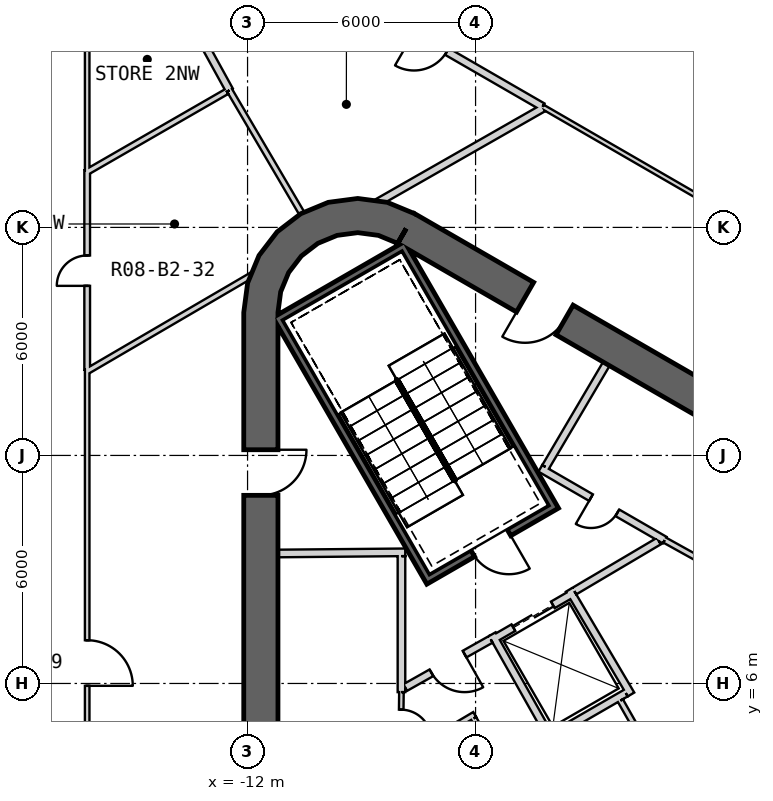
"""IFC4 building model, lengths in metres.
Left out: names, types, materials, properties, quantities, classifications, styles, units other than length and angle.
Written with IfcOpenShell. Run it as: python <this file> out.ifc"""

import sys

from ifc_helpers import new_model, si_unit, direction, frame, frame_2d, origin, place, context, subcontext, project, spatial, polyline, rectangle, outline, extrude, element, fill, save


model = new_model("IFC4")
c1 = context("Model", 3, precision=1e-05, world=origin(), true_north=direction((0.0, 1.0)))
c2 = subcontext(c1, "Body", "Model", "MODEL_VIEW")
j1 = project(units=[si_unit("LENGTHUNIT", "METRE"), si_unit("PLANEANGLEUNIT", "RADIAN")], contexts=[c1])
p1 = place(None, origin())
s1 = spatial("IfcSite", under=j1, at=p1, CompositionType="ELEMENT")
p2 = place(p1, origin())
s2 = spatial("IfcBuilding", under=s1, at=p2, CompositionType="ELEMENT")
p3 = place(p2, frame((0.0, 0.0, -11.0)))
s3 = spatial("IfcBuildingStorey", under=s2, at=p3, CompositionType="ELEMENT", Elevation=-11.0)
p4 = place(p3, frame((-2.593, 37.429, -0.4), z_axis=(0.0, 0.0, 1.0), x_axis=(0.866166543136, -0.499755459752, 0.0)))
e1 = element("IfcWall", 1, at=p4, inside=s3, PredefinedType="SHEAR", context=c2, shape_type="SweptSolid", body=[
    extrude(rectangle(XDim=41.622, YDim=1.2, at=frame_2d((20.811, 0.0))), origin(), (0.0, 0.0, 1.0), 5.9),
])
p5 = place(p3, frame((19.475, 2.208, -0.4), z_axis=(0.0, 0.0, 1.0), x_axis=(-0.866028369851, 0.499994862586, 0.0)))
e2 = element("IfcWall", 2, at=p5, inside=s3, PredefinedType="SHEAR", context=c2, shape_type="SweptSolid", body=[
    extrude(rectangle(XDim=31.523, YDim=0.9, at=frame_2d((15.762, 0.0))), origin(), (0.0, 0.0, 1.0), 5.9),
])
p6 = place(p5, frame((3.612, 0.0, 0.4)))
e3 = element("IfcOpeningElement", 3, at=p6, cuts=e2, PredefinedType="OPENING", context=c2, shape_type="SweptSolid", body=[
    extrude(rectangle(XDim=1.2, YDim=2.4, at=frame_2d((0.6, 1.2))), frame((0.0, 0.46, 0.0), z_axis=(0.0, -1.0, 0.0), x_axis=(1.0, 0.0, 0.0)), (0.0, 0.0, 1.0), 0.92),
])
p7 = place(p5, frame((26.712, 0.0, 0.4)))
e4 = element("IfcOpeningElement", 4, at=p7, cuts=e2, PredefinedType="OPENING", context=c2, shape_type="SweptSolid", body=[
    extrude(rectangle(XDim=1.2, YDim=2.4, at=frame_2d((0.6, 1.2))), frame((0.0, 0.46, 0.0), z_axis=(0.0, -1.0, 0.0), x_axis=(1.0, 0.0, 0.0)), (0.0, 0.0, 1.0), 0.92),
])
p8 = place(p3, frame((-11.65, 15.762, -0.4), z_axis=(0.0, 0.0, 1.0), x_axis=(0.0, -1.0, 0.0)))
e5 = element("IfcWall", 5, at=p8, inside=s3, PredefinedType="SHEAR", context=c2, shape_type="SweptSolid", body=[
    extrude(rectangle(XDim=31.523, YDim=0.9, at=frame_2d((15.762, 0.0))), origin(), (0.0, 0.0, 1.0), 5.9),
])
p9 = place(p8, frame((3.612, 0.0, 0.4)))
e6 = element("IfcOpeningElement", 6, at=p9, cuts=e5, PredefinedType="OPENING", context=c2, shape_type="SweptSolid", body=[
    extrude(rectangle(XDim=1.2, YDim=2.4, at=frame_2d((0.6, 1.2))), frame((0.0, 0.46, 0.0), z_axis=(0.0, -1.0, 0.0), x_axis=(1.0, 0.0, 0.0)), (0.0, 0.0, 1.0), 0.92),
])
p10 = place(p8, frame((26.712, 0.0, 0.4)))
e7 = element("IfcOpeningElement", 7, at=p10, cuts=e5, PredefinedType="OPENING", context=c2, shape_type="SweptSolid", body=[
    extrude(rectangle(XDim=1.2, YDim=2.4, at=frame_2d((0.6, 1.2))), frame((0.0, 0.46, 0.0), z_axis=(0.0, -1.0, 0.0), x_axis=(1.0, 0.0, 0.0)), (0.0, 0.0, 1.0), 0.92),
])
p11 = place(p3, frame((0.0, 0.0, -0.4)))
e8 = element("IfcWall", 8, at=p11, inside=s3, PredefinedType="SHEAR", context=c2, shape_type="SweptSolid", body=[
    extrude(outline(polyline([(-7.6, 18.36), (-8.323, 18.659), (-9.1, 18.762), (-9.876, 18.659), (-10.6, 18.36), (-11.221, 17.883), (-11.698, 17.262), (-11.998, 16.538), (-12.1, 15.762), (-11.2, 15.762), (-11.128, 16.305), (-10.919, 16.812), (-10.585, 17.247), (-10.15, 17.58), (-9.644, 17.79), (-9.1, 17.862), (-8.556, 17.79), (-8.05, 17.58), (-7.6, 18.36)])), origin(), (0.0, 0.0, 1.0), 5.9),
])
p12 = place(p3, frame((-11.245, 15.678, -0.4), z_axis=(0.0, 0.0, 1.0), x_axis=(0.499977274689, -0.866038523851, 0.0)))
e9 = element("IfcWall", 9, at=p12, inside=s3, PredefinedType="SHEAR", context=c2, shape_type="SweptSolid", body=[
    extrude(rectangle(XDim=8.1, YDim=0.2, at=frame_2d((4.05, 0.0))), origin(), (0.0, 0.0, 1.0), 5.5),
])
p13 = place(p3, frame((-7.818, 17.541, -0.4), z_axis=(0.0, 0.0, 1.0), x_axis=(-0.866044365799, -0.499967155389, 0.0)))
e10 = element("IfcWall", 10, at=p13, inside=s3, PredefinedType="SHEAR", context=c2, shape_type="SweptSolid", body=[
    extrude(rectangle(XDim=3.8, YDim=0.2, at=frame_2d((1.9, 0.0))), origin(), (0.0, 0.0, 1.0), 5.5),
])
p14 = place(p3, frame((-7.854, 17.405, -0.4), z_axis=(0.0, 0.0, 1.0), x_axis=(0.499997992926, -0.866026562566, 0.0)))
e11 = element("IfcWall", 11, at=p14, inside=s3, PredefinedType="SHEAR", context=c2, shape_type="SweptSolid", body=[
    extrude(rectangle(XDim=7.9, YDim=0.2, at=frame_2d((3.95, 0.0))), origin(), (0.0, 0.0, 1.0), 5.5),
])
p15 = place(p3, frame((-7.159, 8.8, -0.4), z_axis=(0.0, 0.0, 1.0), x_axis=(0.866047807691, 0.499961193289, 0.0)))
e12 = element("IfcWall", 12, at=p15, inside=s3, PredefinedType="SHEAR", context=c2, shape_type="SweptSolid", body=[
    extrude(rectangle(XDim=3.6, YDim=0.2, at=frame_2d((1.8, 0.0))), origin(), (0.0, 0.0, 1.0), 5.5),
])
p16 = place(p15, frame((1.25, 0.0, 0.4)))
e13 = element("IfcOpeningElement", 13, at=p16, cuts=e12, PredefinedType="OPENING", context=c2, shape_type="SweptSolid", body=[
    extrude(rectangle(XDim=1.1, YDim=2.1, at=frame_2d((0.55, 1.05))), frame((0.0, 0.11, 0.0), z_axis=(0.0, -1.0, 0.0), x_axis=(1.0, 0.0, 0.0)), (0.0, 0.0, 1.0), 0.22),
])
p17 = place(p3, frame((-5.524, 7.168, 0.0), z_axis=(0.0, 0.0, 1.0), x_axis=(0.866024647952, 0.500001309137, 0.0)))
e14 = element("IfcWall", 14, at=p17, inside=s3, PredefinedType="PLUMBINGWALL", context=c2, shape_type="SweptSolid", body=[
    extrude(rectangle(XDim=2.4, YDim=0.2, at=frame_2d((1.2, 0.0))), origin(), (0.0, 0.0, 1.0), 5.1),
])
p18 = place(p17, frame((0.6, 0.0, 0.0)))
e15 = element("IfcOpeningElement", 15, at=p18, cuts=e14, PredefinedType="OPENING", context=c2, shape_type="SweptSolid", body=[
    extrude(rectangle(XDim=1.2, YDim=2.4, at=frame_2d((0.6, 1.2))), frame((0.0, 0.11, 0.0), z_axis=(0.0, -1.0, 0.0), x_axis=(1.0, 0.0, 0.0)), (0.0, 0.0, 1.0), 0.22),
])
p19 = place(p3, frame((-3.538, 8.465, 0.0), z_axis=(0.0, 0.0, 1.0), x_axis=(0.508616218331, -0.860993346345, 0.0)))
e16 = element("IfcWall", 16, at=p19, inside=s3, PredefinedType="PLUMBINGWALL", context=c2, shape_type="SweptSolid", body=[
    extrude(rectangle(XDim=3.2, YDim=0.2, at=frame_2d((1.6, 0.0))), origin(), (0.0, 0.0, 1.0), 5.1),
])
p20 = place(p3, frame((-2.047, 5.746, 0.0), z_axis=(0.0, 0.0, 1.0), x_axis=(-0.866024647952, -0.500001309137, 0.0)))
e17 = element("IfcWall", 17, at=p20, inside=s3, PredefinedType="PLUMBINGWALL", context=c2, shape_type="SweptSolid", body=[
    extrude(rectangle(XDim=2.4, YDim=0.2, at=frame_2d((1.2, 0.0))), origin(), (0.0, 0.0, 1.0), 5.1),
])
p21 = place(p3, frame((-5.562, 7.296, 0.0), z_axis=(0.0, 0.0, 1.0), x_axis=(0.49134651263, -0.870964180966, 0.0)))
e18 = element("IfcWall", 18, at=p21, inside=s3, PredefinedType="PLUMBINGWALL", context=c2, shape_type="SweptSolid", body=[
    extrude(rectangle(XDim=3.0, YDim=0.2, at=frame_2d((1.5, 0.0))), origin(), (0.0, 0.0, 1.0), 5.1),
])
p22 = place(p3, frame((-7.85, 9.451, 0.0), z_axis=(0.0, 0.0, 1.0), x_axis=(-0.999957167047, -0.009255488683, 0.0)))
e19 = element("IfcWall", 19, at=p22, inside=s3, PredefinedType="PARTITIONING", context=c2, shape_type="SweptSolid", body=[
    extrude(rectangle(XDim=3.35, YDim=0.2, at=frame_2d((1.675, 0.0))), origin(), (0.0, 0.0, 1.0), 5.1),
])
p23 = place(p3, frame((-7.95, 5.772, 0.0), z_axis=(0.0, 0.0, 1.0), x_axis=(0.0, 1.0, 0.0)))
e20 = element("IfcWall", 20, at=p23, inside=s3, PredefinedType="PARTITIONING", context=c2, shape_type="SweptSolid", body=[
    extrude(rectangle(XDim=3.578, YDim=0.2, at=frame_2d((1.789, 0.0))), origin(), (0.0, 0.0, 1.0), 5.1),
])
p24 = place(p3, frame((-7.971, 4.05, 0.0), z_axis=(0.0, 0.0, 1.0), x_axis=(0.012047318415, 0.999927428426, 0.0)))
e21 = element("IfcWall", 21, at=p24, inside=s3, PredefinedType="PARTITIONING", context=c2, shape_type="SweptSolid", body=[
    extrude(rectangle(XDim=1.723, YDim=0.12, at=frame_2d((0.861, 0.0))), origin(), (0.0, 0.0, 1.0), 5.1),
])
p25 = place(p24, frame((0.461, 0.0, 0.0)))
e22 = element("IfcOpeningElement", 22, at=p25, cuts=e21, PredefinedType="OPENING", context=c2, shape_type="SweptSolid", body=[
    extrude(rectangle(XDim=0.8, YDim=2.1, at=frame_2d((0.4, 1.05))), frame((0.0, 0.07, 0.0), z_axis=(0.0, -1.0, 0.0), x_axis=(1.0, 0.0, 0.0)), (0.0, 0.0, 1.0), 0.14),
])
p26 = place(p3, frame((-4.296, 11.66, 0.0), z_axis=(0.0, 0.0, 1.0), x_axis=(0.866027389382, -0.499996560828, 0.0)))
e23 = element("IfcWall", 23, at=p26, inside=s3, PredefinedType="PARTITIONING", context=c2, shape_type="SweptSolid", body=[
    extrude(rectangle(XDim=3.778, YDim=0.2, at=frame_2d((1.889, 0.0))), origin(), (0.0, 0.0, 1.0), 5.1),
])
p27 = place(p26, frame((1.539, 0.0, 0.0)))
e24 = element("IfcOpeningElement", 24, at=p27, cuts=e23, PredefinedType="OPENING", context=c2, shape_type="SweptSolid", body=[
    extrude(rectangle(XDim=0.8, YDim=2.1, at=frame_2d((0.4, 1.05))), frame((0.0, 0.11, 0.0), z_axis=(0.0, -1.0, 0.0), x_axis=(1.0, 0.0, 0.0)), (0.0, 0.0, 1.0), 0.22),
])
p28 = place(p3, frame((-2.558, 14.409, 0.0), z_axis=(0.0, 0.0, 1.0), x_axis=(-0.508018930956, -0.861345903683, 0.0)))
e25 = element("IfcWall", 25, at=p28, inside=s3, PredefinedType="PARTITIONING", context=c2, shape_type="SweptSolid", body=[
    extrude(rectangle(XDim=3.15, YDim=0.2, at=frame_2d((1.575, 0.0))), origin(), (0.0, 0.0, 1.0), 5.1),
])
p29 = place(p3, frame((0.483, 8.936, 0.0), z_axis=(0.0, 0.0, 1.0), x_axis=(-0.874290944206, 0.485402250592, 0.0)))
e26 = element("IfcWall", 26, at=p29, inside=s3, PredefinedType="PLUMBINGWALL", context=c2, shape_type="SweptSolid", body=[
    extrude(rectangle(XDim=1.723, YDim=0.15, at=frame_2d((0.861, 0.0))), origin(), (0.0, 0.0, 1.0), 5.1),
])
p30 = place(p3, frame((-1.179, 9.745, 0.0), z_axis=(0.0, 0.0, 1.0), x_axis=(-0.860630814782, -0.509229418482, 0.0)))
e27 = element("IfcWall", 27, at=p30, inside=s3, PredefinedType="PARTITIONING", context=c2, shape_type="SweptSolid", body=[
    extrude(rectangle(XDim=2.582, YDim=0.2, at=frame_2d((1.291, 0.0))), origin(), (0.0, 0.0, 1.0), 5.1),
])
p31 = place(p3, frame((-5.6, 7.16, 0.0), z_axis=(0.0, 0.0, 1.0), x_axis=(-0.871350695252, -0.490660744185, 0.0)))
e28 = element("IfcWall", 28, at=p31, inside=s3, PredefinedType="PARTITIONING", context=c2, shape_type="SweptSolid", body=[
    extrude(rectangle(XDim=2.582, YDim=0.2, at=frame_2d((1.291, 0.0))), origin(), (0.0, 0.0, 1.0), 5.1),
])
p32 = place(p31, frame((0.791, 0.0, 0.0)))
e29 = element("IfcOpeningElement", 29, at=p32, cuts=e28, PredefinedType="OPENING", context=c2, shape_type="SweptSolid", body=[
    extrude(rectangle(XDim=1.0, YDim=2.1, at=frame_2d((0.5, 1.05))), frame((0.0, 0.11, 0.0), z_axis=(0.0, -1.0, 0.0), x_axis=(1.0, 0.0, 0.0)), (0.0, 0.0, 1.0), 0.22),
])
p33 = place(p3, frame((-2.189, 5.549, 0.0), z_axis=(0.0, 0.0, 1.0), x_axis=(0.494335077001, -0.869271437266, 0.0)))
e30 = element("IfcWall", 30, at=p33, inside=s3, PredefinedType="PLUMBINGWALL", context=c2, shape_type="SweptSolid", body=[
    extrude(rectangle(XDim=4.404, YDim=0.15, at=frame_2d((2.202, 0.0))), origin(), (0.0, 0.0, 1.0), 5.1),
])
p34 = place(p3, frame((-6.024, 5.183, 0.0), z_axis=(0.0, 0.0, 1.0), x_axis=(-0.860126804455, -0.510080268447, 0.0)))
e31 = element("IfcWall", 31, at=p34, inside=s3, PredefinedType="PLUMBINGWALL", context=c2, shape_type="SweptSolid", body=[
    extrude(rectangle(XDim=2.24, YDim=0.15, at=frame_2d((1.12, 0.0))), origin(), (0.0, 0.0, 1.0), 5.1),
])
p35 = place(p3, frame((-4.551, 2.482, 0.0), z_axis=(0.0, 0.0, 1.0), x_axis=(-0.499990139034, 0.866031096941, 0.0)))
e32 = element("IfcWall", 32, at=p35, inside=s3, PredefinedType="PLUMBINGWALL", context=c2, shape_type="SweptSolid", body=[
    extrude(rectangle(XDim=3.0, YDim=0.15, at=frame_2d((1.5, 0.0))), origin(), (0.0, 0.0, 1.0), 5.1),
])
p36 = place(p35, frame((1.137, 0.0, 0.0)))
e33 = element("IfcOpeningElement", 33, at=p36, cuts=e32, PredefinedType="OPENING", context=c2, shape_type="SweptSolid", body=[
    extrude(rectangle(XDim=0.8, YDim=2.1, at=frame_2d((0.4, 1.05))), frame((0.0, 0.085, 0.0), z_axis=(0.0, -1.0, 0.0), x_axis=(1.0, 0.0, 0.0)), (0.0, 0.0, 1.0), 0.17),
])
p37 = place(p3, frame((30.376, 1.169, 0.0), z_axis=(0.0, 0.0, 1.0), x_axis=(-0.865777000343, 0.500430000777, 0.0)))
e34 = element("IfcWall", 34, at=p37, inside=s3, PredefinedType="PARTITIONING", context=c2, shape_type="SweptSolid", body=[
    extrude(rectangle(XDim=39.978, YDim=0.12, at=frame_2d((19.989, 0.0))), origin(), (0.0, 0.0, 1.0), 4.18),
])
p38 = place(p37, frame((28.784, 0.0, 0.0)))
e35 = element("IfcOpeningElement", 35, at=p38, cuts=e34, PredefinedType="OPENING", context=c2, shape_type="SweptSolid", body=[
    extrude(rectangle(XDim=1.2, YDim=2.4, at=frame_2d((0.6, 1.2))), frame((0.0, 0.07, 0.0), z_axis=(0.0, -1.0, 0.0), x_axis=(1.0, 0.0, 0.0)), (0.0, 0.0, 1.0), 0.14),
])
p39 = place(p37, frame((9.984, 0.0, 0.0)))
e36 = element("IfcOpeningElement", 36, at=p39, cuts=e34, PredefinedType="OPENING", context=c2, shape_type="SweptSolid", body=[
    extrude(rectangle(XDim=1.2, YDim=2.4, at=frame_2d((0.6, 1.2))), frame((0.0, 0.07, 0.0), z_axis=(0.0, -1.0, 0.0), x_axis=(1.0, 0.0, 0.0)), (0.0, 0.0, 1.0), 0.14),
])
p40 = place(p3, frame((-16.22, -14.256, 0.0), z_axis=(0.0, 0.0, 1.0), x_axis=(0.0, 1.0, 0.0)))
e37 = element("IfcWall", 37, at=p40, inside=s3, PredefinedType="PARTITIONING", context=c2, shape_type="SweptSolid", body=[
    extrude(rectangle(XDim=28.512, YDim=0.12, at=frame_2d((14.256, 0.0))), origin(), (0.0, 0.0, 1.0), 4.38),
])
p41 = place(p40, frame((7.194, 0.0, 0.0)))
e38 = element("IfcOpeningElement", 38, at=p41, cuts=e37, PredefinedType="OPENING", context=c2, shape_type="SweptSolid", body=[
    extrude(rectangle(XDim=1.2, YDim=2.4, at=frame_2d((0.6, 1.2))), frame((0.0, 0.07, 0.0), z_axis=(0.0, -1.0, 0.0), x_axis=(1.0, 0.0, 0.0)), (0.0, 0.0, 1.0), 0.14),
])
p42 = place(p40, frame((20.194, 0.0, 0.0)))
e39 = element("IfcOpeningElement", 39, at=p42, cuts=e37, PredefinedType="OPENING", context=c2, shape_type="SweptSolid", body=[
    extrude(rectangle(XDim=1.2, YDim=2.4, at=frame_2d((0.6, 1.2))), frame((0.0, 0.07, 0.0), z_axis=(0.0, -1.0, 0.0), x_axis=(1.0, 0.0, 0.0)), (0.0, 0.0, 1.0), 0.14),
])
p43 = place(p3, frame((-16.22, 19.501, 0.0), z_axis=(0.0, 0.0, 1.0), x_axis=(0.0, 1.0, 0.0)))
e40 = element("IfcWall", 40, at=p43, inside=s3, PredefinedType="PARTITIONING", context=c2, shape_type="SweptSolid", body=[
    extrude(rectangle(XDim=8.558, YDim=0.12, at=frame_2d((4.279, 0.0))), origin(), (0.0, 0.0, 1.0), 4.07),
])
p44 = place(p43, frame((3.806, 0.0, 0.0)))
e41 = element("IfcOpeningElement", 41, at=p44, cuts=e40, PredefinedType="OPENING", context=c2, shape_type="SweptSolid", body=[
    extrude(rectangle(XDim=1.0, YDim=2.1, at=frame_2d((0.5, 1.05))), frame((0.0, 0.07, 0.0), z_axis=(0.0, -1.0, 0.0), x_axis=(1.0, 0.0, 0.0)), (0.0, 0.0, 1.0), 0.14),
])
p45 = place(p3, frame((-4.236, 21.175, 0.0), z_axis=(0.0, 0.0, 1.0), x_axis=(-0.86602711848, 0.499997030048, 0.0)))
e42 = element("IfcWall", 42, at=p45, inside=s3, PredefinedType="PARTITIONING", context=c2, shape_type="SweptSolid", body=[
    extrude(rectangle(XDim=6.901, YDim=0.2, at=frame_2d((3.451, 0.0))), origin(), (0.0, 0.0, 1.0), 4.18),
])
p46 = place(p45, frame((2.907, 0.0, 0.0)))
e43 = element("IfcOpeningElement", 43, at=p46, cuts=e42, PredefinedType="OPENING", context=c2, shape_type="SweptSolid", body=[
    extrude(rectangle(XDim=1.0, YDim=2.1, at=frame_2d((0.5, 1.05))), frame((0.0, 0.11, 0.0), z_axis=(0.0, -1.0, 0.0), x_axis=(1.0, 0.0, 0.0)), (0.0, 0.0, 1.0), 0.22),
])
p47 = place(p3, frame((-16.22, 14.256, 0.0), z_axis=(0.0, 0.0, 1.0), x_axis=(0.0, 1.0, 0.0)))
e44 = element("IfcWall", 44, at=p47, inside=s3, PredefinedType="PLUMBINGWALL", context=c2, shape_type="SweptSolid", body=[
    extrude(rectangle(XDim=5.245, YDim=0.15, at=frame_2d((2.623, 0.0))), origin(), (0.0, 0.0, 1.0), 4.28),
])
p48 = place(p47, frame((2.206, 0.0, 0.0)))
e45 = element("IfcOpeningElement", 45, at=p48, cuts=e44, PredefinedType="OPENING", context=c2, shape_type="SweptSolid", body=[
    extrude(rectangle(XDim=0.8, YDim=2.1, at=frame_2d((0.4, 1.05))), frame((0.0, 0.085, 0.0), z_axis=(0.0, -1.0, 0.0), x_axis=(1.0, 0.0, 0.0)), (0.0, 0.0, 1.0), 0.17),
])
p49 = place(p3, frame((-4.22, 21.143, 0.0), z_axis=(0.0, 0.0, 1.0), x_axis=(-0.868530929613, -0.495634970825, 0.0)))
e46 = element("IfcWall", 46, at=p49, inside=s3, PredefinedType="PARTITIONING", context=c2, shape_type="SweptSolid", body=[
    extrude(rectangle(XDim=5.166, YDim=0.2, at=frame_2d((2.583, 0.0))), origin(), (0.0, 0.0, 1.0), 4.18),
])
p50 = place(p3, frame((-11.74, 16.832, 0.0), z_axis=(0.0, 0.0, 1.0), x_axis=(-0.863501067027, -0.504347010741, 0.0)))
e47 = element("IfcWall", 47, at=p50, inside=s3, PredefinedType="PLUMBINGWALL", context=c2, shape_type="SweptSolid", body=[
    extrude(rectangle(XDim=5.166, YDim=0.15, at=frame_2d((2.583, 0.0))), origin(), (0.0, 0.0, 1.0), 4.18),
])
p51 = place(p3, frame((-12.475, 21.609, 0.0), z_axis=(0.0, 0.0, 1.0), x_axis=(0.50651186771, -0.862232989318, 0.0)))
e48 = element("IfcWall", 48, at=p51, inside=s3, PredefinedType="PLUMBINGWALL", context=c2, shape_type="SweptSolid", body=[
    extrude(rectangle(XDim=3.905, YDim=0.15, at=frame_2d((1.953, 0.0))), origin(), (0.0, 0.0, 1.0), 4.07),
])
p52 = place(p3, frame((-13.186, 22.898, 0.0), z_axis=(0.0, 0.0, 1.0), x_axis=(0.482147862589, -0.876089857606, 0.0)))
e49 = element("IfcWall", 49, at=p52, inside=s3, PredefinedType="PARTITIONING", context=c2, shape_type="SweptSolid", body=[
    extrude(rectangle(XDim=1.472, YDim=0.2, at=frame_2d((0.736, 0.0))), origin(), (0.0, 0.0, 1.0), 4.07),
])
p53 = place(p3, frame((-12.544, 21.577, 0.0), z_axis=(0.0, 0.0, 1.0), x_axis=(-0.866492758114, -0.499189643458, 0.0)))
e50 = element("IfcWall", 50, at=p53, inside=s3, PredefinedType="PLUMBINGWALL", context=c2, shape_type="SweptSolid", body=[
    extrude(rectangle(XDim=4.219, YDim=0.15, at=frame_2d((2.109, 0.0))), origin(), (0.0, 0.0, 1.0), 4.07),
])
p54 = place(p16, origin())
e51 = element("IfcDoor", 51, at=p54, inside=s3, OperationType="SINGLE_SWING_RIGHT", PredefinedType="USERDEFINED", context=c2, shape_type="SweptSolid", body=[
    extrude(rectangle(XDim=1.1, YDim=2.1, at=frame_2d((0.55, 1.05))), frame((0.0, 0.025, 0.0), z_axis=(0.0, -1.0, 0.0), x_axis=(1.0, 0.0, 0.0)), (0.0, 0.0, 1.0), 0.05),
])
fill(e13, e51)
p55 = place(p32, origin())
e52 = element("IfcDoor", 52, at=p55, inside=s3, OperationType="SINGLE_SWING_LEFT", PredefinedType="USERDEFINED", context=c2, shape_type="SweptSolid", body=[
    extrude(rectangle(XDim=1.0, YDim=2.1, at=frame_2d((0.5, 1.05))), frame((0.0, 0.025, 0.0), z_axis=(0.0, -1.0, 0.0), x_axis=(1.0, 0.0, 0.0)), (0.0, 0.0, 1.0), 0.05),
])
fill(e29, e52)
p56 = place(p18, origin())
e53 = element("IfcDoor", 53, at=p56, inside=s3, OperationType="SLIDING_TO_LEFT", PredefinedType="USERDEFINED", context=c2, shape_type="SweptSolid", body=[
    extrude(rectangle(XDim=1.2, YDim=2.4, at=frame_2d((0.6, 1.2))), frame((0.0, 0.025, 0.0), z_axis=(0.0, -1.0, 0.0), x_axis=(1.0, 0.0, 0.0)), (0.0, 0.0, 1.0), 0.05),
])
fill(e15, e53)
p57 = place(p25, origin())
e54 = element("IfcDoor", 54, at=p57, inside=s3, OperationType="SINGLE_SWING_LEFT", PredefinedType="USERDEFINED", context=c2, shape_type="SweptSolid", body=[
    extrude(rectangle(XDim=0.8, YDim=2.1, at=frame_2d((0.4, 1.05))), frame((0.0, 0.025, 0.0), z_axis=(0.0, -1.0, 0.0), x_axis=(1.0, 0.0, 0.0)), (0.0, 0.0, 1.0), 0.05),
])
fill(e22, e54)
p58 = place(p27, origin())
e55 = element("IfcDoor", 55, at=p58, inside=s3, OperationType="SINGLE_SWING_LEFT", PredefinedType="USERDEFINED", context=c2, shape_type="SweptSolid", body=[
    extrude(rectangle(XDim=0.8, YDim=2.1, at=frame_2d((0.4, 1.05))), frame((0.0, 0.025, 0.0), z_axis=(0.0, -1.0, 0.0), x_axis=(1.0, 0.0, 0.0)), (0.0, 0.0, 1.0), 0.05),
])
fill(e24, e55)
p59 = place(p42, origin())
e56 = element("IfcDoor", 56, at=p59, inside=s3, OperationType="SINGLE_SWING_LEFT", PredefinedType="USERDEFINED", context=c2, shape_type="SweptSolid", body=[
    extrude(rectangle(XDim=1.2, YDim=2.4, at=frame_2d((0.6, 1.2))), frame((0.0, 0.025, 0.0), z_axis=(0.0, -1.0, 0.0), x_axis=(1.0, 0.0, 0.0)), (0.0, 0.0, 1.0), 0.05),
])
fill(e39, e56)
p60 = place(p46, origin())
e57 = element("IfcDoor", 57, at=p60, inside=s3, OperationType="SINGLE_SWING_RIGHT", PredefinedType="USERDEFINED", context=c2, shape_type="SweptSolid", body=[
    extrude(rectangle(XDim=1.0, YDim=2.1, at=frame_2d((0.5, 1.05))), frame((0.0, 0.025, 0.0), z_axis=(0.0, -1.0, 0.0), x_axis=(1.0, 0.0, 0.0)), (0.0, 0.0, 1.0), 0.05),
])
fill(e43, e57)
p61 = place(p48, origin())
e58 = element("IfcDoor", 58, at=p61, inside=s3, OperationType="SINGLE_SWING_LEFT", PredefinedType="USERDEFINED", context=c2, shape_type="SweptSolid", body=[
    extrude(rectangle(XDim=0.8, YDim=2.1, at=frame_2d((0.4, 1.05))), frame((0.0, 0.025, 0.0), z_axis=(0.0, -1.0, 0.0), x_axis=(1.0, 0.0, 0.0)), (0.0, 0.0, 1.0), 0.05),
])
fill(e45, e58)
p62 = place(p7, origin())
e59 = element("IfcDoor", 59, at=p62, inside=s3, OperationType="SINGLE_SWING_RIGHT", PredefinedType="USERDEFINED", context=c2, shape_type="SweptSolid", body=[
    extrude(rectangle(XDim=1.2, YDim=2.4, at=frame_2d((0.6, 1.2))), frame((0.0, 0.025, 0.0), z_axis=(0.0, -1.0, 0.0), x_axis=(1.0, 0.0, 0.0)), (0.0, 0.0, 1.0), 0.05),
])
fill(e4, e59)
p63 = place(p9, origin())
e60 = element("IfcDoor", 60, at=p63, inside=s3, OperationType="SINGLE_SWING_LEFT", PredefinedType="USERDEFINED", context=c2, shape_type="SweptSolid", body=[
    extrude(rectangle(XDim=1.2, YDim=2.4, at=frame_2d((0.6, 1.2))), frame((0.0, 0.025, 0.0), z_axis=(0.0, -1.0, 0.0), x_axis=(1.0, 0.0, 0.0)), (0.0, 0.0, 1.0), 0.05),
])
fill(e6, e60)
save(model, sys.argv[1])
